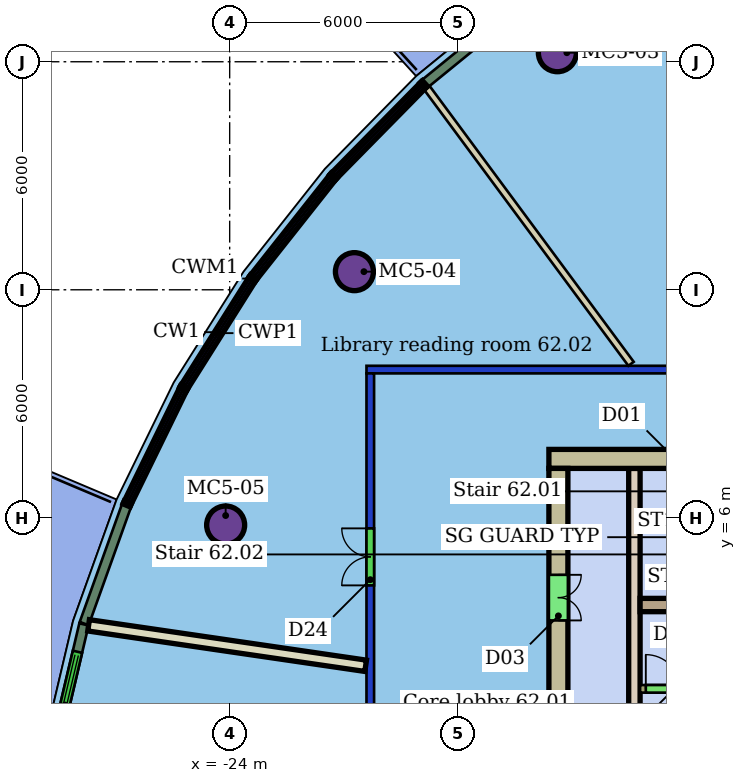
"""IFC4 building model, lengths in metres.
Left out: names, types, materials, properties, quantities, classifications, styles, units other than length and angle.
Written with IfcOpenShell. Run it as: python <this file> out.ifc"""

import sys

from ifc_helpers import new_model, si_unit, direction, frame, frame_2d, origin, origin_2d, place, context, subcontext, project, spatial, rectangle, hollow_circle, extrude, element, fill, save


model = new_model("IFC4")
c1 = context("Model", 3, precision=1e-05, world=origin(), true_north=direction((0.0, 1.0)))
c2 = subcontext(c1, "Body", "Model", "MODEL_VIEW")
j1 = project(units=[si_unit("LENGTHUNIT", "METRE"), si_unit("PLANEANGLEUNIT", "RADIAN")], contexts=[c1])
p1 = place(None, origin())
s1 = spatial("IfcSite", under=j1, at=p1, CompositionType="ELEMENT")
p2 = place(p1, origin())
s2 = spatial("IfcBuilding", under=s1, at=p2, CompositionType="ELEMENT")
p3 = place(p2, frame((0.0, 0.0, 254.1)))
s3 = spatial("IfcBuildingStorey", under=s2, at=p3, CompositionType="ELEMENT", Elevation=254.1)
for number, where, z_axis, x_axis in (
    (1, (-15.377, 18.238, 0.0), (0.0, 0.0, 1.0), (1.0, 0.0, 0.0)),
    (2, (-20.718, 12.477, 0.0), (0.0, 0.0, 1.0), (1.0, 0.0, 0.0)),
    (3, (-24.106, 5.81, 0.0), (0.0, 0.0, 1.0), (1.0, 0.0, 0.0)),
):
    element("IfcColumn", number, at=place(p3, frame(where, z_axis=z_axis, x_axis=x_axis)), inside=s3, PredefinedType="COLUMN", context=c2, shape_type="SweptSolid", body=[
        extrude(hollow_circle(Radius=0.5, WallThickness=0.04, at=origin_2d()), origin(), (0.0, 0.0, 1.0), 3.45),
    ])
p4 = place(p3, frame((-20.3, -9.8, 0.0), z_axis=(0.0, 0.0, 1.0), x_axis=(0.0, 1.0, 0.0)))
e4 = element("IfcWall", 4, at=p4, inside=s3, PredefinedType="PARTITIONING", context=c2, shape_type="SweptSolid", body=[
    extrude(rectangle(XDim=19.6, YDim=0.2, at=frame_2d((9.8, 0.0))), origin(), (0.0, 0.0, 1.0), 3.1),
])
p5 = place(p4, frame((14.022, 0.0, 0.0)))
e5 = element("IfcOpeningElement", 5, at=p5, cuts=e4, PredefinedType="OPENING", context=c2, shape_type="SweptSolid", body=[
    extrude(rectangle(XDim=1.5, YDim=2.1, at=frame_2d((0.75, 1.05))), frame((0.0, 0.11, 0.0), z_axis=(0.0, -1.0, 0.0), x_axis=(1.0, 0.0, 0.0)), (0.0, 0.0, 1.0), 0.22),
])
p6 = place(p4, frame((6.812, 0.0, 0.0)))
e6 = element("IfcOpeningElement", 6, at=p6, cuts=e4, PredefinedType="OPENING", context=c2, shape_type="SweptSolid", body=[
    extrude(rectangle(XDim=1.8, YDim=2.4, at=frame_2d((0.9, 1.2))), frame((0.0, 0.11, 0.0), z_axis=(0.0, -1.0, 0.0), x_axis=(1.0, 0.0, 0.0)), (0.0, 0.0, 1.0), 0.22),
])
p7 = place(p3, frame((-20.4, 9.9, 0.0), z_axis=(0.0, 0.0, 1.0), x_axis=(1.0, 0.0, 0.0)))
e7 = element("IfcWall", 7, at=p7, inside=s3, PredefinedType="PARTITIONING", context=c2, shape_type="SweptSolid", body=[
    extrude(rectangle(XDim=28.8, YDim=0.2, at=frame_2d((14.4, 0.0))), origin(), (0.0, 0.0, 1.0), 3.1),
])
p8 = place(p7, frame((10.218, 0.0, 0.0)))
e8 = element("IfcOpeningElement", 8, at=p8, cuts=e7, PredefinedType="OPENING", context=c2, shape_type="SweptSolid", body=[
    extrude(rectangle(XDim=1.5, YDim=2.1, at=frame_2d((0.75, 1.05))), frame((0.0, 0.11, 0.0), z_axis=(0.0, -1.0, 0.0), x_axis=(1.0, 0.0, 0.0)), (0.0, 0.0, 1.0), 0.22),
])
p9 = place(p7, frame((21.358, 0.0, 0.0)))
e9 = element("IfcOpeningElement", 9, at=p9, cuts=e7, PredefinedType="OPENING", context=c2, shape_type="SweptSolid", body=[
    extrude(rectangle(XDim=1.0, YDim=2.1, at=frame_2d((0.5, 1.05))), frame((0.0, 0.11, 0.0), z_axis=(0.0, -1.0, 0.0), x_axis=(1.0, 0.0, 0.0)), (0.0, 0.0, 1.0), 0.22),
])
p10 = place(p3, frame((-18.807, 17.308, 0.0), z_axis=(0.0, 0.0, 1.0), x_axis=(0.594811545717, -0.803865178423, 0.0)))
e10 = element("IfcWall", 10, at=p10, inside=s3, PredefinedType="PARTITIONING", context=c2, shape_type="SweptSolid", body=[
    extrude(rectangle(XDim=9.026, YDim=0.175, at=frame_2d((4.513, 0.0))), origin(), (0.0, 0.0, 1.0), 3.45),
])
p11 = place(p3, frame((-27.712, 3.171, 0.0), z_axis=(0.0, 0.0, 1.0), x_axis=(0.98950467143, -0.144500883103, 0.0)))
e11 = element("IfcWall", 11, at=p11, inside=s3, PredefinedType="PARTITIONING", context=c2, shape_type="SweptSolid", body=[
    extrude(rectangle(XDim=7.368, YDim=0.3, at=frame_2d((3.684, 0.0))), origin(), (0.0, 0.0, 1.0), 3.45),
])
p12 = place(p3, frame((-16.298, 19.513, 0.0), z_axis=(0.0, 0.0, 1.0), x_axis=(-0.775212105866, -0.631701029696, 0.0)))
e12 = element("IfcWall", 12, at=p12, inside=s3, PredefinedType="SOLIDWALL", context=c2, shape_type="SweptSolid", body=[
    extrude(rectangle(XDim=3.29, YDim=0.25, at=frame_2d((1.645, 0.0))), origin(), (0.0, 0.0, 1.0), 3.15),
])
p13 = place(p3, frame((-26.718, 6.313, 0.0), z_axis=(0.0, 0.0, 1.0), x_axis=(-0.337652360294, -0.941270887464, 0.0)))
e13 = element("IfcWall", 13, at=p13, inside=s3, PredefinedType="SOLIDWALL", context=c2, shape_type="SweptSolid", body=[
    extrude(rectangle(XDim=3.29, YDim=0.25, at=frame_2d((1.645, 0.0))), origin(), (0.0, 0.0, 1.0), 3.15),
])
p14 = place(p3, frame((-27.835, 3.196, 0.0), z_axis=(0.0, 0.0, 1.0), x_axis=(-0.229620288748, -0.973280290048, 0.0)))
e14 = element("IfcWall", 14, at=p14, inside=s3, PredefinedType="SOLIDWALL", context=c2, shape_type="SweptSolid", body=[
    extrude(rectangle(XDim=3.279, YDim=0.25, at=frame_2d((1.64, 0.0))), origin(), (0.0, 0.0, 1.0), 3.15),
])
p15 = place(p14, frame((0.74, 0.0, 0.0)))
e15 = element("IfcOpeningElement", 15, at=p15, cuts=e14, PredefinedType="OPENING", context=c2, shape_type="SweptSolid", body=[
    extrude(rectangle(XDim=1.8, YDim=2.4, at=frame_2d((0.9, 1.2))), frame((0.0, 0.135, 0.0), z_axis=(0.0, -1.0, 0.0), x_axis=(1.0, 0.0, 0.0)), (0.0, 0.0, 1.0), 0.27),
])
p16 = place(p3, frame((-6.0, 7.55, 0.0), z_axis=(0.0, 0.0, 1.0), x_axis=(-1.0, 0.0, 0.0)))
e16 = element("IfcWall", 16, at=p16, inside=s3, PredefinedType="SHEAR", context=c2, shape_type="SweptSolid", body=[
    extrude(rectangle(XDim=9.6, YDim=0.5, at=frame_2d((4.8, 0.0))), origin(), (0.0, 0.0, 1.0), 3.3),
])
p17 = place(p16, frame((5.2, 0.0, 0.0)))
e17 = element("IfcOpeningElement", 17, at=p17, cuts=e16, PredefinedType="OPENING", context=c2, shape_type="SweptSolid", body=[
    extrude(rectangle(XDim=1.2, YDim=2.1, at=frame_2d((0.6, 1.05))), frame((0.0, 0.26, 0.0), z_axis=(0.0, -1.0, 0.0), x_axis=(1.0, 0.0, 0.0)), (0.0, 0.0, 1.0), 0.52),
])
p18 = place(p3, frame((-15.35, 7.3, 0.0), z_axis=(0.0, 0.0, 1.0), x_axis=(0.0, -1.0, 0.0)))
e18 = element("IfcWall", 18, at=p18, inside=s3, PredefinedType="SHEAR", context=c2, shape_type="SweptSolid", body=[
    extrude(rectangle(XDim=14.6, YDim=0.5, at=frame_2d((7.3, 0.0))), origin(), (0.0, 0.0, 1.0), 3.3),
])
p19 = place(p18, frame((10.6, 0.0, 0.0)))
e19 = element("IfcOpeningElement", 19, at=p19, cuts=e18, PredefinedType="OPENING", context=c2, shape_type="SweptSolid", body=[
    extrude(rectangle(XDim=1.2, YDim=2.1, at=frame_2d((0.6, 1.05))), frame((0.0, 0.26, 0.0), z_axis=(0.0, -1.0, 0.0), x_axis=(1.0, 0.0, 0.0)), (0.0, 0.0, 1.0), 0.52),
])
p20 = place(p18, frame((2.8, 0.0, 0.0)))
e20 = element("IfcOpeningElement", 20, at=p20, cuts=e18, PredefinedType="OPENING", context=c2, shape_type="SweptSolid", body=[
    extrude(rectangle(XDim=1.2, YDim=2.1, at=frame_2d((0.6, 1.05))), frame((0.0, 0.26, 0.0), z_axis=(0.0, -1.0, 0.0), x_axis=(1.0, 0.0, 0.0)), (0.0, 0.0, 1.0), 0.52),
])
p21 = place(p3, frame((-13.2, 3.705, 0.0), z_axis=(0.0, 0.0, 1.0), x_axis=(1.0, 0.0, 0.0)))
e21 = element("IfcWall", 21, at=p21, inside=s3, PredefinedType="SHEAR", context=c2, shape_type="SweptSolid", body=[
    extrude(rectangle(XDim=7.2, YDim=0.35, at=frame_2d((3.6, 0.0))), origin(), (0.0, 0.0, 1.0), 3.3),
])
p22 = place(p3, frame((-13.35, 7.3, 0.0), z_axis=(0.0, 0.0, 1.0), x_axis=(0.0, -1.0, 0.0)))
e22 = element("IfcWall", 22, at=p22, inside=s3, PredefinedType="SHEAR", context=c2, shape_type="SweptSolid", body=[
    extrude(rectangle(XDim=14.6, YDim=0.3, at=frame_2d((7.3, 0.0))), origin(), (0.0, 0.0, 1.0), 3.3),
])
p23 = place(p22, frame((6.55, 0.0, 0.0)))
e23 = element("IfcOpeningElement", 23, at=p23, cuts=e22, PredefinedType="OPENING", context=c2, shape_type="SweptSolid", body=[
    extrude(rectangle(XDim=1.5, YDim=2.1, at=frame_2d((0.75, 1.05))), frame((0.0, 0.16, 0.0), z_axis=(0.0, -1.0, 0.0), x_axis=(1.0, 0.0, 0.0)), (0.0, 0.0, 1.0), 0.32),
])
p24 = place(p3, frame((-13.2, 1.5, 0.0), z_axis=(0.0, 0.0, 1.0), x_axis=(1.0, 0.0, 0.0)))
e24 = element("IfcWall", 24, at=p24, inside=s3, PredefinedType="SHEAR", context=c2, shape_type="SweptSolid", body=[
    extrude(rectangle(XDim=14.4, YDim=0.2, at=frame_2d((7.2, 0.0))), origin(), (0.0, 0.0, 1.0), 3.3),
])
p25 = place(p24, frame((10.312, 0.0, 0.0)))
e25 = element("IfcOpeningElement", 25, at=p25, cuts=e24, PredefinedType="OPENING", context=c2, shape_type="SweptSolid", body=[
    extrude(rectangle(XDim=1.1, YDim=2.1, at=frame_2d((0.55, 1.05))), frame((0.0, 0.11, 0.0), z_axis=(0.0, -1.0, 0.0), x_axis=(1.0, 0.0, 0.0)), (0.0, 0.0, 1.0), 0.22),
])
p26 = place(p24, frame((12.754, 0.0, 0.0)))
e26 = element("IfcOpeningElement", 26, at=p26, cuts=e24, PredefinedType="OPENING", context=c2, shape_type="SweptSolid", body=[
    extrude(rectangle(XDim=1.1, YDim=2.1, at=frame_2d((0.55, 1.05))), frame((0.0, 0.11, 0.0), z_axis=(0.0, -1.0, 0.0), x_axis=(1.0, 0.0, 0.0)), (0.0, 0.0, 1.0), 0.22),
])
p27 = place(p24, frame((0.15, 0.0, 0.0)))
e27 = element("IfcOpeningElement", 27, at=p27, cuts=e24, PredefinedType="OPENING", context=c2, shape_type="SweptSolid", body=[
    extrude(rectangle(XDim=0.9, YDim=2.1, at=frame_2d((0.45, 1.05))), frame((0.0, 0.11, 0.0), z_axis=(0.0, -1.0, 0.0), x_axis=(1.0, 0.0, 0.0)), (0.0, 0.0, 1.0), 0.22),
])
p28 = place(p24, frame((4.222, 0.0, 0.0)))
e28 = element("IfcOpeningElement", 28, at=p28, cuts=e24, PredefinedType="OPENING", context=c2, shape_type="SweptSolid", body=[
    extrude(rectangle(XDim=0.9, YDim=2.1, at=frame_2d((0.45, 1.05))), frame((0.0, 0.11, 0.0), z_axis=(0.0, -1.0, 0.0), x_axis=(1.0, 0.0, 0.0)), (0.0, 0.0, 1.0), 0.22),
])
p29 = place(p24, frame((8.367, 0.0, 0.0)))
e29 = element("IfcOpeningElement", 29, at=p29, cuts=e24, PredefinedType="OPENING", context=c2, shape_type="SweptSolid", body=[
    extrude(rectangle(XDim=1.0, YDim=2.1, at=frame_2d((0.5, 1.05))), frame((0.0, 0.11, 0.0), z_axis=(0.0, -1.0, 0.0), x_axis=(1.0, 0.0, 0.0)), (0.0, 0.0, 1.0), 0.22),
])
p30 = place(p5, origin())
e30 = element("IfcDoor", 30, at=p30, inside=s3, OperationType="DOUBLE_DOOR_SINGLE_SWING", PredefinedType="DOOR", context=c2, shape_type="SweptSolid", body=[
    extrude(rectangle(XDim=1.5, YDim=2.1, at=frame_2d((0.75, 1.05))), frame((0.0, 0.025, 0.0), z_axis=(0.0, -1.0, 0.0), x_axis=(1.0, 0.0, 0.0)), (0.0, 0.0, 1.0), 0.05),
])
fill(e5, e30)
p31 = place(p15, origin())
e31 = element("IfcDoor", 31, at=p31, inside=s3, OperationType="DOUBLE_DOOR_SLIDING", PredefinedType="DOOR", context=c2, shape_type="SweptSolid", body=[
    extrude(rectangle(XDim=1.8, YDim=2.4, at=frame_2d((0.9, 1.2))), frame((0.0, 0.025, 0.0), z_axis=(0.0, -1.0, 0.0), x_axis=(1.0, 0.0, 0.0)), (0.0, 0.0, 1.0), 0.05),
])
fill(e15, e31)
p32 = place(p20, origin())
e32 = element("IfcDoor", 32, at=p32, inside=s3, OperationType="DOUBLE_DOOR_SINGLE_SWING", PredefinedType="NOTDEFINED", context=c2, shape_type="SweptSolid", body=[
    extrude(rectangle(XDim=1.2, YDim=2.1, at=frame_2d((0.6, 1.05))), frame((0.0, 0.025, 0.0), z_axis=(0.0, -1.0, 0.0), x_axis=(1.0, 0.0, 0.0)), (0.0, 0.0, 1.0), 0.05),
])
fill(e20, e32)
p33 = place(p27, origin())
e33 = element("IfcDoor", 33, at=p33, inside=s3, OperationType="SINGLE_SWING_LEFT", PredefinedType="NOTDEFINED", context=c2, shape_type="SweptSolid", body=[
    extrude(rectangle(XDim=0.9, YDim=2.1, at=frame_2d((0.45, 1.05))), frame((0.0, 0.025, 0.0), z_axis=(0.0, -1.0, 0.0), x_axis=(1.0, 0.0, 0.0)), (0.0, 0.0, 1.0), 0.05),
])
fill(e27, e33)
save(model, sys.argv[1])
